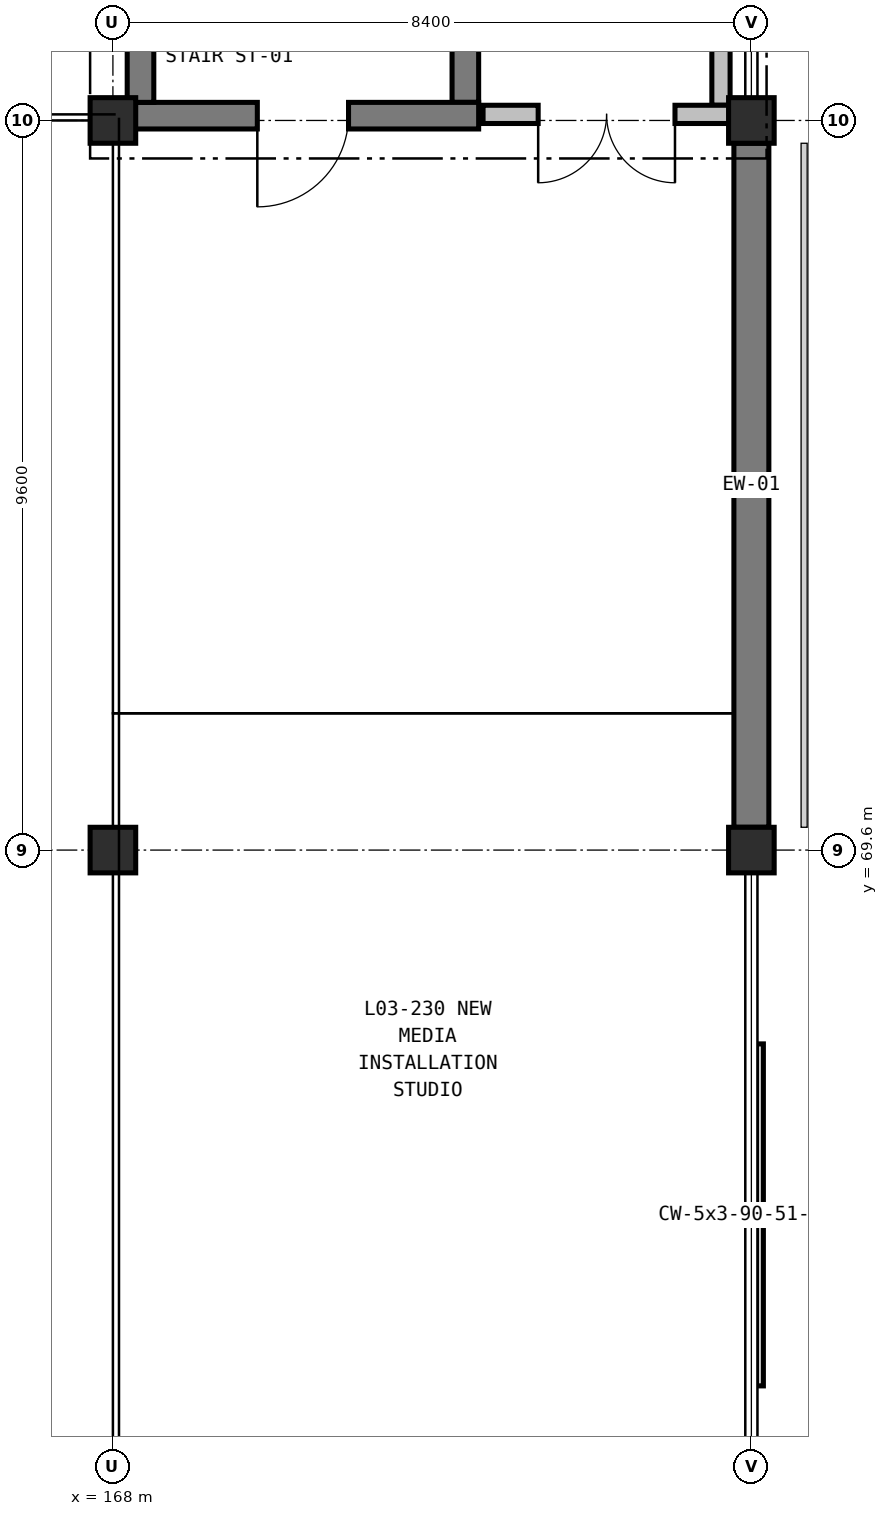
"""IFC4 building model, lengths in metres.
Left out: names, types, materials, properties, quantities, classifications, styles, units other than length and angle.
Written with IfcOpenShell. Run it as: python <this file> out.ifc"""

import sys

from ifc_helpers import new_model, si_unit, direction, frame, frame_2d, origin, origin_2d, place, context, subcontext, project, spatial, rectangle, extrude, element, fill, save


model = new_model("IFC4")
c1 = context("Model", 3, precision=1e-05, world=origin(), true_north=direction((0.0, 1.0)))
c2 = subcontext(c1, "Body", "Model", "MODEL_VIEW")
j1 = project(units=[si_unit("LENGTHUNIT", "METRE"), si_unit("PLANEANGLEUNIT", "RADIAN")], contexts=[c1])
p1 = place(None, origin())
s1 = spatial("IfcSite", under=j1, at=p1, CompositionType="ELEMENT")
p2 = place(p1, origin())
s2 = spatial("IfcBuilding", under=s1, at=p2, CompositionType="ELEMENT")
p3 = place(p2, frame((0.0, 0.0, 16.8)))
s3 = spatial("IfcBuildingStorey", under=s2, at=p3, CompositionType="ELEMENT", Elevation=16.8)
for number, where, z_axis, x_axis in (
    (1, (168.0, 69.6, 0.0), (0.0, 0.0, 1.0), (1.0, 0.0, 0.0)),
    (2, (168.0, 79.2, 0.0), (0.0, 0.0, 1.0), (1.0, 0.0, 0.0)),
    (3, (176.4, 69.6, 0.0), (0.0, 0.0, 1.0), (1.0, 0.0, 0.0)),
    (4, (176.4, 79.2, 0.0), (0.0, 0.0, 1.0), (1.0, 0.0, 0.0)),
):
    element("IfcColumn", number, at=place(p3, frame(where, z_axis=z_axis, x_axis=x_axis)), inside=s3, PredefinedType="COLUMN", context=c2, shape_type="SweptSolid", body=[
        extrude(rectangle(XDim=0.6, YDim=0.6, at=origin_2d()), origin(), (0.0, 0.0, 1.0), 5.4),
    ])
p4 = place(p3, frame((176.4, 78.9, 0.0), z_axis=(0.0, 0.0, 1.0), x_axis=(0.0, -1.0, 0.0)))
e5 = element("IfcWall", 5, at=p4, inside=s3, PredefinedType="SOLIDWALL", context=c2, shape_type="SweptSolid", body=[
    extrude(rectangle(XDim=9.0, YDim=0.46, at=frame_2d((4.5, 0.0))), origin(), (0.0, 0.0, 1.0), 5.1),
])
p5 = place(p3, frame((172.637, 88.562, 0.0), z_axis=(0.0, 0.0, 1.0), x_axis=(0.0, -1.0, 0.0)))
e6 = element("IfcWall", 6, at=p5, inside=s3, PredefinedType="SHEAR", context=c2, shape_type="SweptSolid", body=[
    extrude(rectangle(XDim=9.124, YDim=0.35, at=frame_2d((4.562, 0.0))), origin(), (0.0, 0.0, 1.0), 5.1),
])
p6 = place(p3, frame((172.812, 79.263, 0.0), z_axis=(0.0, 0.0, 1.0), x_axis=(-1.0, 0.0, 0.0)))
e7 = element("IfcWall", 7, at=p6, inside=s3, PredefinedType="SHEAR", context=c2, shape_type="SweptSolid", body=[
    extrude(rectangle(XDim=4.624, YDim=0.35, at=frame_2d((2.312, 0.0))), origin(), (0.0, 0.0, 1.0), 5.1),
])
p7 = place(p6, frame((1.712, 0.0, 0.0)))
e8 = element("IfcOpeningElement", 8, at=p7, cuts=e7, PredefinedType="OPENING", context=c2, shape_type="SweptSolid", body=[
    extrude(rectangle(XDim=1.2, YDim=2.2, at=frame_2d((0.6, 1.1))), frame((0.0, 0.185, 0.0), z_axis=(0.0, -1.0, 0.0), x_axis=(1.0, 0.0, 0.0)), (0.0, 0.0, 1.0), 0.37),
])
p8 = place(p3, frame((168.363, 79.438, 0.0), z_axis=(0.0, 0.0, 1.0), x_axis=(0.0, 1.0, 0.0)))
e9 = element("IfcWall", 9, at=p8, inside=s3, PredefinedType="SHEAR", context=c2, shape_type="SweptSolid", body=[
    extrude(rectangle(XDim=9.124, YDim=0.35, at=frame_2d((4.562, 0.0))), origin(), (0.0, 0.0, 1.0), 5.1),
])
p9 = place(p3, frame((176.0, 84.9, 0.0), z_axis=(0.0, 0.0, 1.0), x_axis=(0.0, -1.0, 0.0)))
e10 = element("IfcWall", 10, at=p9, inside=s3, PredefinedType="PARTITIONING", context=c2, shape_type="SweptSolid", body=[
    extrude(rectangle(XDim=5.5, YDim=0.24, at=frame_2d((2.75, 0.0))), origin(), (0.0, 0.0, 1.0), 4.425),
])
p10 = place(p3, frame((176.12, 79.28, 0.0), z_axis=(0.0, 0.0, 1.0), x_axis=(-1.0, 0.0, 0.0)))
e11 = element("IfcWall", 11, at=p10, inside=s3, PredefinedType="PARTITIONING", context=c2, shape_type="SweptSolid", body=[
    extrude(rectangle(XDim=3.25, YDim=0.24, at=frame_2d((1.625, 0.0))), origin(), (0.0, 0.0, 1.0), 4.425),
])
p11 = place(p10, frame((0.725, 0.0, 0.0)))
e12 = element("IfcOpeningElement", 12, at=p11, cuts=e11, PredefinedType="OPENING", context=c2, shape_type="SweptSolid", body=[
    extrude(rectangle(XDim=1.8, YDim=2.25, at=frame_2d((0.9, 1.125))), frame((0.0, 0.13, 0.0), z_axis=(0.0, -1.0, 0.0), x_axis=(1.0, 0.0, 0.0)), (0.0, 0.0, 1.0), 0.26),
])
p12 = place(p7, origin())
e13 = element("IfcDoor", 13, at=p12, inside=s3, OperationType="SINGLE_SWING_RIGHT", PredefinedType="DOOR", context=c2, shape_type="SweptSolid", body=[
    extrude(rectangle(XDim=1.2, YDim=2.2, at=frame_2d((0.6, 1.1))), frame((0.0, 0.025, 0.0), z_axis=(0.0, -1.0, 0.0), x_axis=(1.0, 0.0, 0.0)), (0.0, 0.0, 1.0), 0.05),
])
fill(e8, e13)
p13 = place(p11, origin())
e14 = element("IfcDoor", 14, at=p13, inside=s3, OperationType="DOUBLE_DOOR_SINGLE_SWING", PredefinedType="DOOR", context=c2, shape_type="SweptSolid", body=[
    extrude(rectangle(XDim=1.8, YDim=2.25, at=frame_2d((0.9, 1.125))), frame((0.0, 0.025, 0.0), z_axis=(0.0, -1.0, 0.0), x_axis=(1.0, 0.0, 0.0)), (0.0, 0.0, 1.0), 0.05),
])
fill(e12, e14)
save(model, sys.argv[1])
